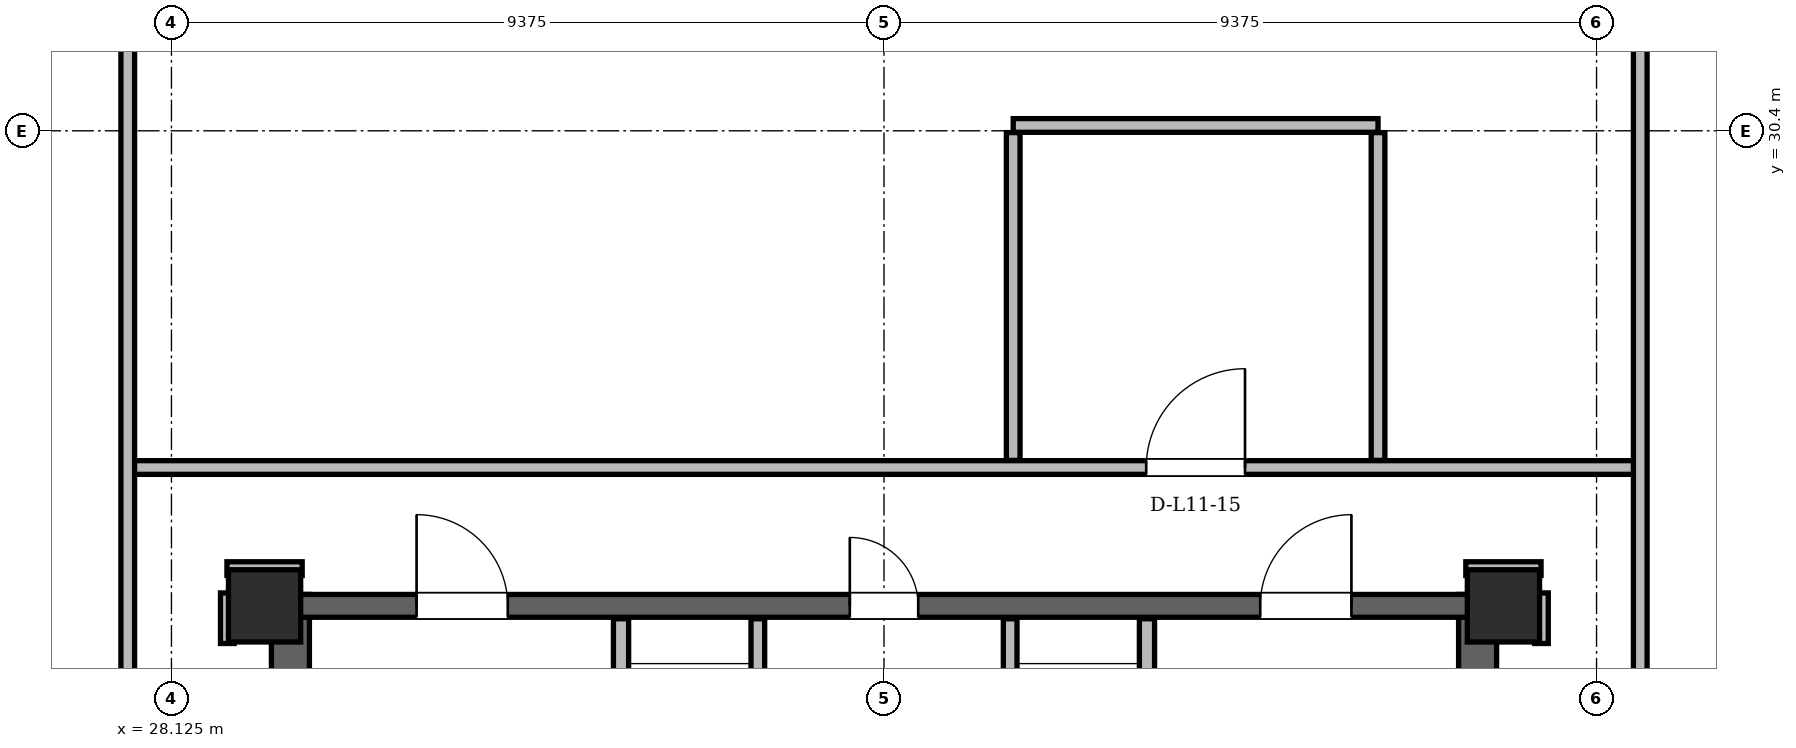
"""IFC4 building model, lengths in metres.
Left out: names, types, materials, properties, quantities, classifications, styles, units other than length and angle.
Written with IfcOpenShell. Run it as: python <this file> out.ifc"""

import sys

from ifc_helpers import new_model, si_unit, direction, frame, frame_2d, origin, origin_2d, place, context, subcontext, project, spatial, rectangle, hollow_rectangle, extrude, element, fill, save


model = new_model("IFC4")
c1 = context("Model", 3, precision=1e-05, world=origin(), true_north=direction((0.0, 1.0)))
c2 = subcontext(c1, "Body", "Model", "MODEL_VIEW")
j1 = project(units=[si_unit("LENGTHUNIT", "METRE"), si_unit("PLANEANGLEUNIT", "RADIAN")], contexts=[c1])
p1 = place(None, origin())
s1 = spatial("IfcSite", under=j1, at=p1, CompositionType="ELEMENT")
p2 = place(p1, origin())
s2 = spatial("IfcBuilding", under=s1, at=p2, CompositionType="ELEMENT")
p3 = place(p2, frame((0.0, 0.0, 45.3)))
s3 = spatial("IfcBuildingStorey", under=s2, at=p3, CompositionType="ELEMENT", Elevation=45.3)
for number, where, z_axis, x_axis in (
    (1, (45.65, 24.15, 0.0), (0.0, 0.0, 1.0), (1.0, 0.0, 0.0)),
    (2, (29.35, 24.15, 0.0), (0.0, 0.0, 1.0), (1.0, 0.0, 0.0)),
):
    element("IfcColumn", number, at=place(p3, frame(where, z_axis=z_axis, x_axis=x_axis)), inside=s3, PredefinedType="COLUMN", context=c2, shape_type="SweptSolid", body=[
        extrude(hollow_rectangle(XDim=0.95, YDim=0.95, WallThickness=0.08, at=origin_2d()), origin(), (0.0, 0.0, 1.0), 3.6),
    ])
for number, where, z_axis, x_axis in (
    (3, (29.69, 11.0, 0.0), (0.0, 0.0, 1.0), (0.0, 1.0, 0.0)),
    (4, (45.31, 11.0, 0.0), (0.0, 0.0, 1.0), (0.0, 1.0, 0.0)),
):
    element("IfcWall", number, at=place(p3, frame(where, z_axis=z_axis, x_axis=x_axis)), inside=s3, PredefinedType="SHEAR", context=c2, shape_type="SweptSolid", body=[
        extrude(rectangle(XDim=13.3, YDim=0.5, at=frame_2d((6.65, 0.0))), origin(), (0.0, 0.0, 1.0), 3.36),
    ])
p4 = place(p3, frame((29.65, 24.15, 0.0), z_axis=(0.0, 0.0, 1.0), x_axis=(1.0, 0.0, 0.0)))
e5 = element("IfcWall", 5, at=p4, inside=s3, PredefinedType="SHEAR", context=c2, shape_type="SweptSolid", body=[
    extrude(rectangle(XDim=15.7, YDim=0.3, at=frame_2d((7.85, 0.0))), origin(), (0.0, 0.0, 1.0), 3.36),
])
p5 = place(p4, frame((1.7, 0.0, 0.0)))
e6 = element("IfcOpeningElement", 6, at=p5, cuts=e5, PredefinedType="OPENING", context=c2, shape_type="SweptSolid", body=[
    extrude(rectangle(XDim=1.2, YDim=2.2, at=frame_2d((0.6, 1.1))), frame((0.0, 0.15, 0.0), z_axis=(0.0, -1.0, 0.0), x_axis=(1.0, 0.0, 0.0)), (0.0, 0.0, 1.0), 0.3),
])
p6 = place(p4, frame((12.8, 0.0, 0.0)))
e7 = element("IfcOpeningElement", 7, at=p6, cuts=e5, PredefinedType="OPENING", context=c2, shape_type="SweptSolid", body=[
    extrude(rectangle(XDim=1.2, YDim=2.2, at=frame_2d((0.6, 1.1))), frame((0.0, 0.15, 0.0), z_axis=(0.0, -1.0, 0.0), x_axis=(1.0, 0.0, 0.0)), (0.0, 0.0, 1.0), 0.3),
])
p7 = place(p4, frame((7.4, 0.0, 0.0)))
e8 = element("IfcOpeningElement", 8, at=p7, cuts=e5, PredefinedType="OPENING", context=c2, shape_type="SweptSolid", body=[
    extrude(rectangle(XDim=0.9, YDim=2.05, at=frame_2d((0.45, 1.025))), frame((0.0, 0.15, 0.0), z_axis=(0.0, -1.0, 0.0), x_axis=(1.0, 0.0, 0.0)), (0.0, 0.0, 1.0), 0.3),
])
p8 = place(p3, frame((61.584, 14.829, 0.0), z_axis=(0.0, 0.0, 1.0), x_axis=(-0.500004112523, 0.866023029405, 0.0)))
e9 = element("IfcWall", 9, at=p8, inside=s3, PredefinedType="SOLIDWALL", context=c2, shape_type="SweptSolid", body=[
    extrude(rectangle(XDim=33.214, YDim=0.34, at=frame_2d((16.607, 0.0))), origin(), (0.0, 0.0, 1.0), 2.494),
])
p9 = place(p8, frame((7.615, 0.0, 0.0)))
e10 = element("IfcOpeningElement", 10, at=p9, cuts=e9, PredefinedType="OPENING", context=c2, shape_type="SweptSolid", body=[
    extrude(rectangle(XDim=1.5, YDim=2.2, at=frame_2d((0.75, 1.1))), frame((0.0, 0.17, 0.0), z_axis=(0.0, -1.0, 0.0), x_axis=(1.0, 0.0, 0.0)), (0.0, 0.0, 1.0), 0.34),
])
p10 = place(p8, frame((24.925, 0.0, 0.0)))
e11 = element("IfcOpeningElement", 11, at=p10, cuts=e9, PredefinedType="OPENING", context=c2, shape_type="SweptSolid", body=[
    extrude(rectangle(XDim=1.5, YDim=2.2, at=frame_2d((0.75, 1.1))), frame((0.0, 0.17, 0.0), z_axis=(0.0, -1.0, 0.0), x_axis=(1.0, 0.0, 0.0)), (0.0, 0.0, 1.0), 0.34),
])
p11 = place(p8, frame((0.971, 0.0, 0.85)))
e12 = element("IfcOpeningElement", 12, at=p11, cuts=e9, PredefinedType="OPENING", context=c2, shape_type="SweptSolid", body=[
    extrude(rectangle(XDim=1.2, YDim=1.48, at=frame_2d((0.6, 0.74))), frame((0.0, 0.17, 0.0), z_axis=(0.0, -1.0, 0.0), x_axis=(1.0, 0.0, 0.0)), (0.0, 0.0, 1.0), 0.34),
])
p12 = place(p8, frame((2.462, 0.0, 0.85)))
e13 = element("IfcOpeningElement", 13, at=p12, cuts=e9, PredefinedType="OPENING", context=c2, shape_type="SweptSolid", body=[
    extrude(rectangle(XDim=1.2, YDim=1.48, at=frame_2d((0.6, 0.74))), frame((0.0, 0.17, 0.0), z_axis=(0.0, -1.0, 0.0), x_axis=(1.0, 0.0, 0.0)), (0.0, 0.0, 1.0), 0.34),
])
p13 = place(p8, frame((16.965, 0.0, 0.85)))
e14 = element("IfcOpeningElement", 14, at=p13, cuts=e9, PredefinedType="OPENING", context=c2, shape_type="SweptSolid", body=[
    extrude(rectangle(XDim=2.8, YDim=1.534, at=frame_2d((1.4, 0.767))), frame((0.0, 0.17, 0.0), z_axis=(0.0, -1.0, 0.0), x_axis=(1.0, 0.0, 0.0)), (0.0, 0.0, 1.0), 0.34),
])
p14 = place(p8, frame((10.823, 0.0, 0.85)))
e15 = element("IfcOpeningElement", 15, at=p14, cuts=e9, PredefinedType="OPENING", context=c2, shape_type="SweptSolid", body=[
    extrude(rectangle(XDim=1.2, YDim=1.48, at=frame_2d((0.6, 0.74))), frame((0.0, 0.17, 0.0), z_axis=(0.0, -1.0, 0.0), x_axis=(1.0, 0.0, 0.0)), (0.0, 0.0, 1.0), 0.34),
])
p15 = place(p8, frame((13.666, 0.0, 0.85)))
e16 = element("IfcOpeningElement", 16, at=p15, cuts=e9, PredefinedType="OPENING", context=c2, shape_type="SweptSolid", body=[
    extrude(rectangle(XDim=1.2, YDim=1.48, at=frame_2d((0.6, 0.74))), frame((0.0, 0.17, 0.0), z_axis=(0.0, -1.0, 0.0), x_axis=(1.0, 0.0, 0.0)), (0.0, 0.0, 1.0), 0.34),
])
p16 = place(p8, frame((5.859, 0.0, 0.85)))
e17 = element("IfcOpeningElement", 17, at=p16, cuts=e9, PredefinedType="OPENING", context=c2, shape_type="SweptSolid", body=[
    extrude(rectangle(XDim=0.9, YDim=1.15, at=frame_2d((0.45, 0.575))), frame((0.0, 0.17, 0.0), z_axis=(0.0, -1.0, 0.0), x_axis=(1.0, 0.0, 0.0)), (0.0, 0.0, 1.0), 0.34),
])
p17 = place(p3, frame((30.023, 43.593, 0.0), z_axis=(0.0, 0.0, 1.0), x_axis=(-0.500004112523, -0.866023029405, 0.0)))
e18 = element("IfcWall", 18, at=p17, inside=s3, PredefinedType="SOLIDWALL", context=c2, shape_type="SweptSolid", body=[
    extrude(rectangle(XDim=33.214, YDim=0.34, at=frame_2d((16.607, 0.0))), origin(), (0.0, 0.0, 1.0), 2.494),
])
p18 = place(p17, frame((7.615, 0.0, 0.0)))
e19 = element("IfcOpeningElement", 19, at=p18, cuts=e18, PredefinedType="OPENING", context=c2, shape_type="SweptSolid", body=[
    extrude(rectangle(XDim=1.5, YDim=2.2, at=frame_2d((0.75, 1.1))), frame((0.0, 0.17, 0.0), z_axis=(0.0, -1.0, 0.0), x_axis=(1.0, 0.0, 0.0)), (0.0, 0.0, 1.0), 0.34),
])
p19 = place(p17, frame((25.655, 0.0, 0.0)))
e20 = element("IfcOpeningElement", 20, at=p19, cuts=e18, PredefinedType="OPENING", context=c2, shape_type="SweptSolid", body=[
    extrude(rectangle(XDim=1.3, YDim=2.2, at=frame_2d((0.65, 1.1))), frame((0.0, 0.17, 0.0), z_axis=(0.0, -1.0, 0.0), x_axis=(1.0, 0.0, 0.0)), (0.0, 0.0, 1.0), 0.34),
])
p20 = place(p17, frame((11.292, 0.0, 0.85)))
e21 = element("IfcOpeningElement", 21, at=p20, cuts=e18, PredefinedType="OPENING", context=c2, shape_type="SweptSolid", body=[
    extrude(rectangle(XDim=2.0, YDim=1.534, at=frame_2d((1.0, 0.767))), frame((0.0, 0.17, 0.0), z_axis=(0.0, -1.0, 0.0), x_axis=(1.0, 0.0, 0.0)), (0.0, 0.0, 1.0), 0.34),
])
p21 = place(p17, frame((18.731, 0.0, 0.85)))
e22 = element("IfcOpeningElement", 22, at=p21, cuts=e18, PredefinedType="OPENING", context=c2, shape_type="SweptSolid", body=[
    extrude(rectangle(XDim=1.4, YDim=1.534, at=frame_2d((0.7, 0.767))), frame((0.0, 0.17, 0.0), z_axis=(0.0, -1.0, 0.0), x_axis=(1.0, 0.0, 0.0)), (0.0, 0.0, 1.0), 0.34),
])
p22 = place(p17, frame((30.32, 0.0, 0.85)))
e23 = element("IfcOpeningElement", 23, at=p22, cuts=e18, PredefinedType="OPENING", context=c2, shape_type="SweptSolid", body=[
    extrude(rectangle(XDim=1.8, YDim=1.534, at=frame_2d((0.9, 0.767))), frame((0.0, 0.17, 0.0), z_axis=(0.0, -1.0, 0.0), x_axis=(1.0, 0.0, 0.0)), (0.0, 0.0, 1.0), 0.34),
])
p23 = place(p3, frame((34.04, 19.48, 0.0), z_axis=(0.0, 0.0, 1.0), x_axis=(0.0, 1.0, 0.0)))
e24 = element("IfcWall", 24, at=p23, inside=s3, PredefinedType="PARTITIONING", context=c2, shape_type="SweptSolid", body=[
    extrude(rectangle(XDim=4.5, YDim=0.2, at=frame_2d((2.25, 0.0))), origin(), (0.0, 0.0, 1.0), 2.4),
])
p24 = place(p23, frame((2.12, 0.0, 0.0)))
e25 = element("IfcOpeningElement", 25, at=p24, cuts=e24, PredefinedType="OPENING", context=c2, shape_type="SweptSolid", body=[
    extrude(rectangle(XDim=1.1, YDim=2.2, at=frame_2d((0.55, 1.1))), frame((0.0, 0.1, 0.0), z_axis=(0.0, -1.0, 0.0), x_axis=(1.0, 0.0, 0.0)), (0.0, 0.0, 1.0), 0.2),
])
p25 = place(p3, frame((35.84, 20.96, 0.0), z_axis=(0.0, 0.0, 1.0), x_axis=(0.0, 1.0, 0.0)))
e26 = element("IfcWall", 26, at=p25, inside=s3, PredefinedType="PARTITIONING", context=c2, shape_type="SweptSolid", body=[
    extrude(rectangle(XDim=3.02, YDim=0.18, at=frame_2d((1.51, 0.0))), origin(), (0.0, 0.0, 1.0), 2.4),
])
p26 = place(p3, frame((40.96, 19.48, 0.0), z_axis=(0.0, 0.0, 1.0), x_axis=(0.0, 1.0, 0.0)))
e27 = element("IfcWall", 27, at=p26, inside=s3, PredefinedType="PARTITIONING", context=c2, shape_type="SweptSolid", body=[
    extrude(rectangle(XDim=4.5, YDim=0.2, at=frame_2d((2.25, 0.0))), origin(), (0.0, 0.0, 1.0), 2.4),
])
p27 = place(p26, frame((2.12, 0.0, 0.0)))
e28 = element("IfcOpeningElement", 28, at=p27, cuts=e27, PredefinedType="OPENING", context=c2, shape_type="SweptSolid", body=[
    extrude(rectangle(XDim=1.1, YDim=2.2, at=frame_2d((0.55, 1.1))), frame((0.0, 0.1, 0.0), z_axis=(0.0, -1.0, 0.0), x_axis=(1.0, 0.0, 0.0)), (0.0, 0.0, 1.0), 0.2),
])
p28 = place(p3, frame((39.16, 20.96, 0.0), z_axis=(0.0, 0.0, 1.0), x_axis=(0.0, 1.0, 0.0)))
e29 = element("IfcWall", 29, at=p28, inside=s3, PredefinedType="PARTITIONING", context=c2, shape_type="SweptSolid", body=[
    extrude(rectangle(XDim=3.02, YDim=0.18, at=frame_2d((1.51, 0.0))), origin(), (0.0, 0.0, 1.0), 2.4),
])
for number, where, z_axis, x_axis in (
    (30, (28.855, 24.64, 0.0), (0.0, 0.0, 1.0), (1.0, 0.0, 0.0)),
    (31, (45.155, 24.64, 0.0), (0.0, 0.0, 1.0), (1.0, 0.0, 0.0)),
):
    element("IfcWall", number, at=place(p3, frame(where, z_axis=z_axis, x_axis=x_axis)), inside=s3, PredefinedType="PARTITIONING", context=c2, shape_type="SweptSolid", body=[
        extrude(rectangle(XDim=0.99, YDim=0.18, at=frame_2d((0.495, 0.0))), origin(), (0.0, 0.0, 1.0), 2.738),
    ])
p29 = place(p3, frame((27.55, 25.97, 0.0), z_axis=(0.0, 0.0, 1.0), x_axis=(1.0, 0.0, 0.0)))
e32 = element("IfcWall", 32, at=p29, inside=s3, PredefinedType="PARTITIONING", context=c2, shape_type="SweptSolid", body=[
    extrude(rectangle(XDim=19.9, YDim=0.18, at=frame_2d((9.95, 0.0))), origin(), (0.0, 0.0, 1.0), 2.738),
])
p30 = place(p29, frame((13.4, 0.0, 0.0)))
e33 = element("IfcOpeningElement", 33, at=p30, cuts=e32, PredefinedType="OPENING", context=c2, shape_type="SweptSolid", body=[
    extrude(rectangle(XDim=1.3, YDim=2.2, at=frame_2d((0.65, 1.1))), frame((0.0, 0.09, 0.0), z_axis=(0.0, -1.0, 0.0), x_axis=(1.0, 0.0, 0.0)), (0.0, 0.0, 1.0), 0.18),
])
p31 = place(p3, frame((39.2, 30.47, 0.0), z_axis=(0.0, 0.0, 1.0), x_axis=(1.0, 0.0, 0.0)))
e34 = element("IfcWall", 34, at=p31, inside=s3, PredefinedType="PARTITIONING", context=c2, shape_type="SweptSolid", body=[
    extrude(rectangle(XDim=4.8, YDim=0.18, at=frame_2d((2.4, 0.0))), origin(), (0.0, 0.0, 1.0), 3.36),
])
p32 = place(p3, frame((27.55, 11.044, 0.0), z_axis=(0.0, 0.0, 1.0), x_axis=(0.0, 1.0, 0.0)))
e35 = element("IfcWall", 35, at=p32, inside=s3, PredefinedType="PARTITIONING", context=c2, shape_type="SweptSolid", body=[
    extrude(rectangle(XDim=27.715, YDim=0.18, at=frame_2d((13.858, 0.0))), origin(), (0.0, 0.0, 1.0), 2.738),
])
p33 = place(p32, frame((8.121, 0.0, 0.0)))
e36 = element("IfcOpeningElement", 36, at=p33, cuts=e35, PredefinedType="OPENING", context=c2, shape_type="SweptSolid", body=[
    extrude(rectangle(XDim=1.0, YDim=2.18, at=frame_2d((0.5, 1.09))), frame((0.0, 0.09, 0.0), z_axis=(0.0, -1.0, 0.0), x_axis=(1.0, 0.0, 0.0)), (0.0, 0.0, 1.0), 0.18),
])
p34 = place(p3, frame((28.86, 23.655, 0.0), z_axis=(0.0, 0.0, 1.0), x_axis=(0.0, 1.0, 0.0)))
e37 = element("IfcWall", 37, at=p34, inside=s3, PredefinedType="PARTITIONING", context=c2, shape_type="SweptSolid", body=[
    extrude(rectangle(XDim=0.665, YDim=0.18, at=frame_2d((0.333, 0.0))), origin(), (0.0, 0.0, 1.0), 3.36),
])
p35 = place(p3, frame((39.2, 26.064, 0.0), z_axis=(0.0, 0.0, 1.0), x_axis=(0.0, 1.0, 0.0)))
e38 = element("IfcWall", 38, at=p35, inside=s3, PredefinedType="PARTITIONING", context=c2, shape_type="SweptSolid", body=[
    extrude(rectangle(XDim=4.312, YDim=0.18, at=frame_2d((2.156, 0.0))), origin(), (0.0, 0.0, 1.0), 3.36),
])
p36 = place(p3, frame((44.0, 26.064, 0.0), z_axis=(0.0, 0.0, 1.0), x_axis=(0.0, 1.0, 0.0)))
e39 = element("IfcWall", 39, at=p36, inside=s3, PredefinedType="PARTITIONING", context=c2, shape_type="SweptSolid", body=[
    extrude(rectangle(XDim=4.312, YDim=0.18, at=frame_2d((2.156, 0.0))), origin(), (0.0, 0.0, 1.0), 2.946),
])
p37 = place(p3, frame((46.15, 23.655, 0.0), z_axis=(0.0, 0.0, 1.0), x_axis=(0.0, 1.0, 0.0)))
e40 = element("IfcWall", 40, at=p37, inside=s3, PredefinedType="PARTITIONING", context=c2, shape_type="SweptSolid", body=[
    extrude(rectangle(XDim=0.665, YDim=0.18, at=frame_2d((0.333, 0.0))), origin(), (0.0, 0.0, 1.0), 3.36),
])
p38 = place(p3, frame((47.45, 11.044, 0.0), z_axis=(0.0, 0.0, 1.0), x_axis=(0.0, 1.0, 0.0)))
e41 = element("IfcWall", 41, at=p38, inside=s3, PredefinedType="PARTITIONING", context=c2, shape_type="SweptSolid", body=[
    extrude(rectangle(XDim=27.715, YDim=0.18, at=frame_2d((13.858, 0.0))), origin(), (0.0, 0.0, 1.0), 2.738),
])
p39 = place(p38, frame((10.822, 0.0, 0.0)))
e42 = element("IfcOpeningElement", 42, at=p39, cuts=e41, PredefinedType="OPENING", context=c2, shape_type="SweptSolid", body=[
    extrude(rectangle(XDim=1.0, YDim=2.18, at=frame_2d((0.5, 1.09))), frame((0.0, 0.09, 0.0), z_axis=(0.0, -1.0, 0.0), x_axis=(1.0, 0.0, 0.0)), (0.0, 0.0, 1.0), 0.18),
])
p40 = place(p5, origin())
e43 = element("IfcDoor", 43, at=p40, inside=s3, OperationType="SINGLE_SWING_LEFT", PredefinedType="DOOR", context=c2, shape_type="SweptSolid", body=[
    extrude(rectangle(XDim=1.2, YDim=2.2, at=frame_2d((0.6, 1.1))), frame((0.0, 0.025, 0.0), z_axis=(0.0, -1.0, 0.0), x_axis=(1.0, 0.0, 0.0)), (0.0, 0.0, 1.0), 0.05),
])
fill(e6, e43)
p41 = place(p6, origin())
e44 = element("IfcDoor", 44, at=p41, inside=s3, OperationType="SINGLE_SWING_RIGHT", PredefinedType="DOOR", context=c2, shape_type="SweptSolid", body=[
    extrude(rectangle(XDim=1.2, YDim=2.2, at=frame_2d((0.6, 1.1))), frame((0.0, 0.025, 0.0), z_axis=(0.0, -1.0, 0.0), x_axis=(1.0, 0.0, 0.0)), (0.0, 0.0, 1.0), 0.05),
])
fill(e7, e44)
p42 = place(p7, origin())
e45 = element("IfcDoor", 45, at=p42, inside=s3, OperationType="SINGLE_SWING_LEFT", PredefinedType="DOOR", context=c2, shape_type="SweptSolid", body=[
    extrude(rectangle(XDim=0.9, YDim=2.05, at=frame_2d((0.45, 1.025))), frame((0.0, 0.025, 0.0), z_axis=(0.0, -1.0, 0.0), x_axis=(1.0, 0.0, 0.0)), (0.0, 0.0, 1.0), 0.05),
])
fill(e8, e45)
p43 = place(p30, origin())
e46 = element("IfcDoor", 46, at=p43, inside=s3, OperationType="SINGLE_SWING_RIGHT", PredefinedType="DOOR", context=c2, shape_type="SweptSolid", body=[
    extrude(rectangle(XDim=1.3, YDim=2.2, at=frame_2d((0.65, 1.1))), frame((0.0, 0.025, 0.0), z_axis=(0.0, -1.0, 0.0), x_axis=(1.0, 0.0, 0.0)), (0.0, 0.0, 1.0), 0.05),
])
fill(e33, e46)
save(model, sys.argv[1])
